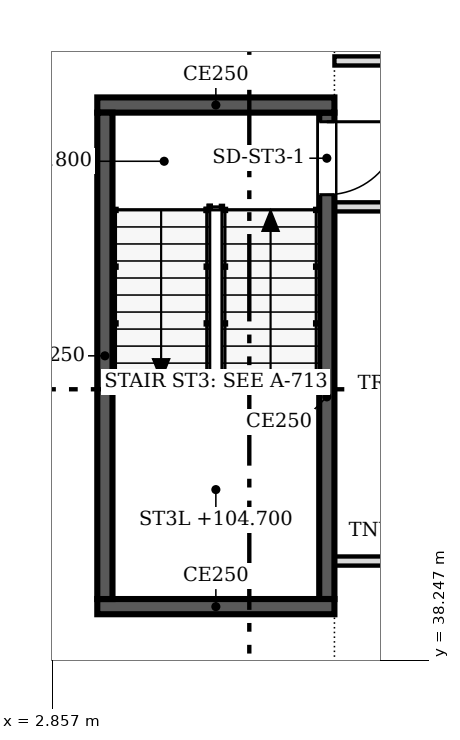
"""IFC4 building model, lengths in metres.
Left out: names, types, materials, properties, quantities, classifications, styles, units other than length and angle.
Written with IfcOpenShell. Run it as: python <this file> out.ifc"""

import sys

from ifc_helpers import new_model, si_unit, direction, frame, frame_2d, origin, place, context, subcontext, project, spatial, rectangle, extrude, source, transform, mapped, element, fill, save


model = new_model("IFC4")
c1 = context("Model", 3, precision=1e-05, world=origin(), true_north=direction((0.0, 1.0)))
c2 = subcontext(c1, "Body", "Model", "MODEL_VIEW")
j1 = project(units=[si_unit("LENGTHUNIT", "METRE"), si_unit("PLANEANGLEUNIT", "RADIAN")], contexts=[c1])
p1 = place(None, origin())
s1 = spatial("IfcSite", under=j1, at=p1, CompositionType="ELEMENT")
p2 = place(p1, origin())
s2 = spatial("IfcBuilding", under=s1, at=p2, CompositionType="ELEMENT")
p3 = place(p2, frame((0.0, 0.0, 102.8)))
s3 = spatial("IfcBuildingStorey", under=s2, at=p3, CompositionType="ELEMENT", Elevation=102.8)
p4 = place(p3, frame((7.5, 39.125, 0.0), z_axis=(0.0, 0.0, 1.0), x_axis=(-1.0, 0.0, 0.0)))
e1 = element("IfcWall", 1, at=p4, inside=s3, PredefinedType="SOLIDWALL", context=c2, shape_type="SweptSolid", body=[
    extrude(rectangle(XDim=3.9, YDim=0.25, at=frame_2d((1.95, 0.0))), origin(), (0.0, 0.0, 1.0), 3.8),
])
p5 = place(p3, frame((3.725, 39.25, 0.0), z_axis=(0.0, 0.0, 1.0), x_axis=(0.0, 1.0, 0.0)))
e2 = element("IfcWall", 2, at=p5, inside=s3, PredefinedType="SOLIDWALL", context=c2, shape_type="SweptSolid", body=[
    extrude(rectangle(XDim=8.0, YDim=0.25, at=frame_2d((4.0, 0.0))), origin(), (0.0, 0.0, 1.0), 3.8),
])
p6 = place(p3, frame((3.6, 47.375, 0.0), z_axis=(0.0, 0.0, 1.0), x_axis=(1.0, 0.0, 0.0)))
e3 = element("IfcWall", 3, at=p6, inside=s3, PredefinedType="SOLIDWALL", context=c2, shape_type="SweptSolid", body=[
    extrude(rectangle(XDim=3.9, YDim=0.25, at=frame_2d((1.95, 0.0))), origin(), (0.0, 0.0, 1.0), 3.8),
])
p7 = place(p3, frame((7.375, 47.25, 0.0), z_axis=(0.0, 0.0, 1.0), x_axis=(0.0, -1.0, 0.0)))
e4 = element("IfcWall", 4, at=p7, inside=s3, PredefinedType="SOLIDWALL", context=c2, shape_type="SweptSolid", body=[
    extrude(rectangle(XDim=8.0, YDim=0.25, at=frame_2d((4.0, 0.0))), origin(), (0.0, 0.0, 1.0), 3.8),
])
m1 = source(origin(), c2, "Body", "SweptSolid", [
    extrude(rectangle(XDim=1.2, YDim=2.1, at=frame_2d((0.6, 1.05))), frame((0.0, 0.135, 0.0), z_axis=(0.0, -1.0, 0.0), x_axis=(1.0, 0.0, 0.0)), (0.0, 0.0, 1.0), 0.27),
])
p8 = place(p7, frame((0.15, 0.0, 0.0)))
e5 = element("IfcOpeningElement", 5, at=p8, cuts=e4, PredefinedType="OPENING", context=c2, shape_type="MappedRepresentation", body=[
    mapped(m1, transform((0.0, 0.0, 0.0), scale=1.0)),
])
p9 = place(p3, frame((12.124, 39.875, 0.0), z_axis=(0.0, 0.0, 1.0), x_axis=(-1.0, 0.0, 0.0)))
e6 = element("IfcWall", 6, at=p9, inside=s3, PredefinedType="PARTITIONING", context=c2, shape_type="SweptSolid", body=[
    extrude(rectangle(XDim=4.624, YDim=0.15, at=frame_2d((2.312, 0.0))), origin(), (0.0, 0.0, 1.0), 2.715),
])
m2 = source(origin(), c2, "Body", "SweptSolid", [
    extrude(rectangle(XDim=0.9, YDim=2.1, at=frame_2d((0.45, 1.05))), frame((0.0, 0.085, 0.0), z_axis=(0.0, -1.0, 0.0), x_axis=(1.0, 0.0, 0.0)), (0.0, 0.0, 1.0), 0.17),
])
p10 = place(p9, frame((1.824, 0.0, 0.0)))
e7 = element("IfcOpeningElement", 7, at=p10, cuts=e6, PredefinedType="OPENING", context=c2, shape_type="MappedRepresentation", body=[
    mapped(m2, transform((0.0, 0.0, 0.0), scale=1.0)),
])
p11 = place(p3, frame((28.4, 45.7, 0.0), z_axis=(0.0, 0.0, 1.0), x_axis=(-1.0, 0.0, 0.0)))
e8 = element("IfcWall", 8, at=p11, inside=s3, PredefinedType="PARTITIONING", context=c2, shape_type="SweptSolid", body=[
    extrude(rectangle(XDim=20.9, YDim=0.15, at=frame_2d((10.45, 0.0))), origin(), (0.0, 0.0, 1.0), 2.715),
])
m3 = source(origin(), c2, "Body", "SweptSolid", [
    extrude(rectangle(XDim=1.8, YDim=2.1, at=frame_2d((0.9, 1.05))), frame((0.0, 0.085, 0.0), z_axis=(0.0, -1.0, 0.0), x_axis=(1.0, 0.0, 0.0)), (0.0, 0.0, 1.0), 0.17),
])
p12 = place(p11, frame((17.7, 0.0, 0.0)))
e9 = element("IfcOpeningElement", 9, at=p12, cuts=e8, PredefinedType="OPENING", context=c2, shape_type="MappedRepresentation", body=[
    mapped(m3, transform((0.0, 0.0, 0.0), scale=1.0)),
])
p13 = place(p3, frame((7.5, 48.1, 0.0), z_axis=(0.0, 0.0, 1.0), x_axis=(1.0, 0.0, 0.0)))
e10 = element("IfcWall", 10, at=p13, inside=s3, PredefinedType="PARTITIONING", context=c2, shape_type="SweptSolid", body=[
    extrude(rectangle(XDim=20.9, YDim=0.15, at=frame_2d((10.45, 0.0))), origin(), (0.0, 0.0, 1.0), 2.715),
])
p14 = place(p13, frame((17.651, 0.0, 0.0)))
e11 = element("IfcOpeningElement", 11, at=p14, cuts=e10, PredefinedType="OPENING", context=c2, shape_type="MappedRepresentation", body=[
    mapped(m2, transform((0.0, 0.0, 0.0), scale=1.0)),
])
p15 = place(p13, frame((2.6, 0.0, 0.0)))
e12 = element("IfcOpeningElement", 12, at=p15, cuts=e10, PredefinedType="OPENING", context=c2, shape_type="MappedRepresentation", body=[
    mapped(m2, transform((0.0, 0.0, 0.0), scale=1.0)),
])
p16 = place(p13, frame((10.2, 0.0, 0.0)))
e13 = element("IfcOpeningElement", 13, at=p16, cuts=e10, PredefinedType="OPENING", context=c2, shape_type="MappedRepresentation", body=[
    mapped(m2, transform((0.0, 0.0, 0.0), scale=1.0)),
])
m4 = source(origin(), c2, "Body", "SweptSolid", [
    extrude(rectangle(XDim=1.2, YDim=2.1, at=frame_2d((0.6, 1.05))), frame((0.0, 0.025, 0.0), z_axis=(0.0, -1.0, 0.0), x_axis=(1.0, 0.0, 0.0)), (0.0, 0.0, 1.0), 0.05),
])
p17 = place(p8, origin())
e14 = element("IfcDoor", 14, at=p17, inside=s3, OperationType="SINGLE_SWING_LEFT", PredefinedType="DOOR", context=c2, shape_type="MappedRepresentation", body=[
    mapped(m4, transform((0.0, 0.0, 0.0), scale=1.0)),
])
fill(e5, e14)
save(model, sys.argv[1])
